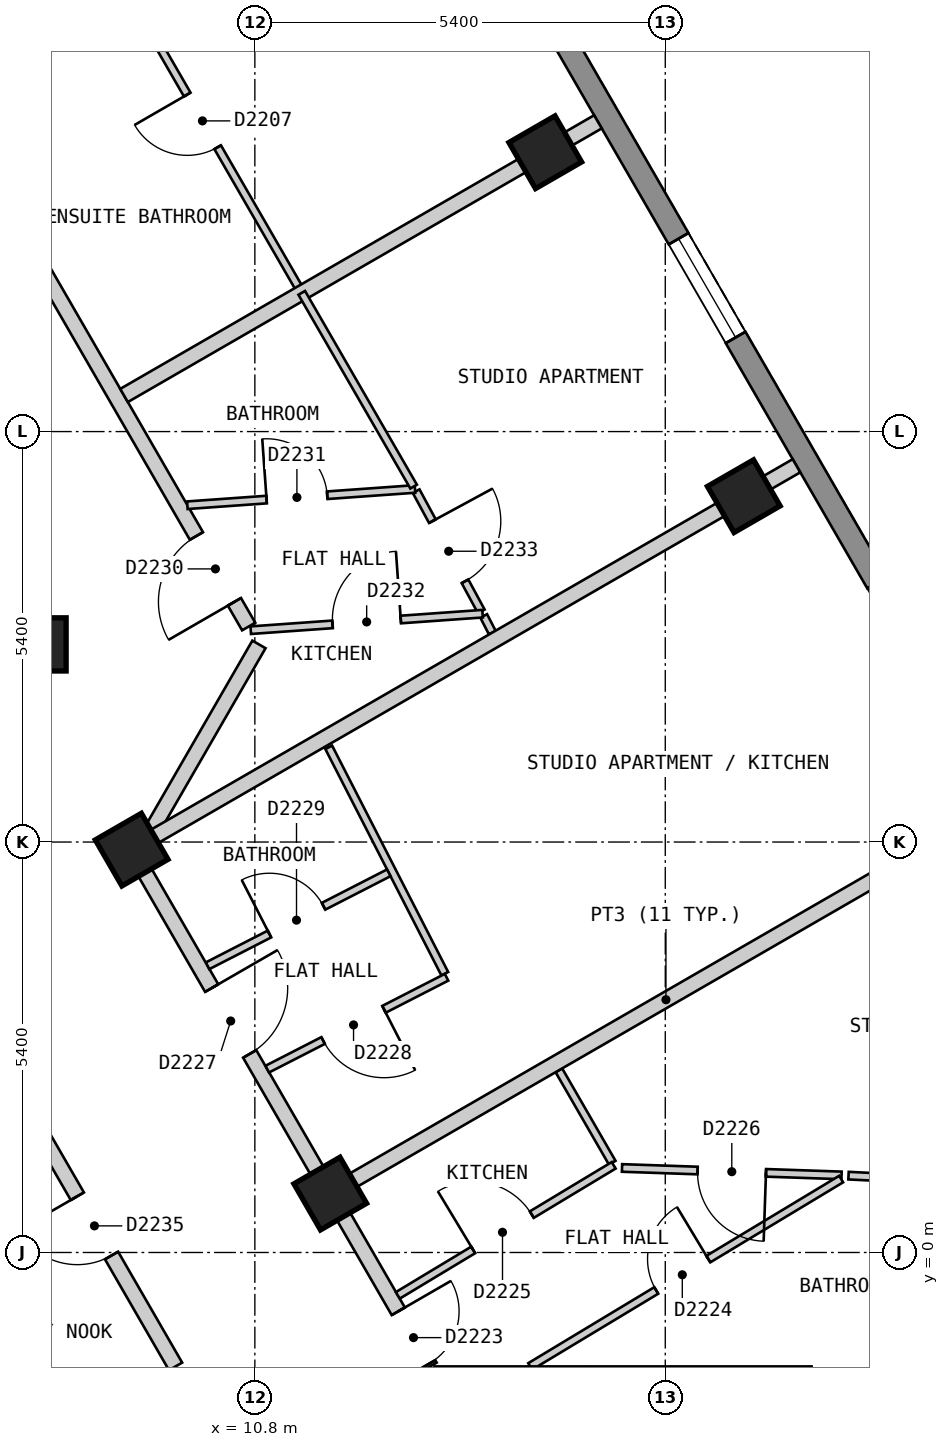
"""IFC4 building model, lengths in metres.
Left out: names, types, materials, properties, quantities, classifications, styles, units other than length and angle.
Written with IfcOpenShell. Run it as: python <this file> out.ifc"""

import sys

from ifc_helpers import new_model, si_unit, direction, frame, frame_2d, origin, origin_2d, place, context, subcontext, project, spatial, polyline, rectangle, outline, extrude, element, fill, save


model = new_model("IFC4")
c1 = context("Model", 3, precision=1e-05, world=origin(), true_north=direction((0.0, 1.0)))
c2 = subcontext(c1, "Body", "Model", "MODEL_VIEW")
j1 = project(units=[si_unit("LENGTHUNIT", "METRE"), si_unit("PLANEANGLEUNIT", "RADIAN")], contexts=[c1])
p1 = place(None, origin())
s1 = spatial("IfcSite", under=j1, at=p1, CompositionType="ELEMENT")
p2 = place(p1, origin())
s2 = spatial("IfcBuilding", under=s1, at=p2, CompositionType="ELEMENT")
p3 = place(p2, frame((0.0, 0.0, 229.8)))
s3 = spatial("IfcBuildingStorey", under=s2, at=p3, CompositionType="ELEMENT", Elevation=229.8)
for number, where, z_axis, x_axis in (
    (1, (17.233, 9.95, 0.0), (0.0, 0.0, 1.0), (-0.5, 0.866, 0.0)),
    (2, (14.621, 14.475, 0.0), (0.0, 0.0, 1.0), (-0.5, 0.866, 0.0)),
    (3, (11.792, 0.775, 0.0), (0.0, 0.0, 1.0), (-0.5, 0.866, 0.0)),
    (4, (9.179, 5.3, 0.0), (0.0, 0.0, 1.0), (-0.5, 0.866, 0.0)),
    (5, (7.967, 8.0, 0.0), (0.0, 0.0, 1.0), (1.0, 0.0, 0.0)),
):
    element("IfcColumn", number, at=place(p3, frame(where, z_axis=z_axis, x_axis=x_axis)), inside=s3, PredefinedType="COLUMN", context=c2, shape_type="SweptSolid", body=[
        extrude(rectangle(XDim=0.7, YDim=0.7, at=origin_2d()), origin(), (0.0, 0.0, 1.0), 3.0),
    ])
p4 = place(p3, frame((23.599, 0.825, 0.0), z_axis=(0.0, 0.0, 1.0), x_axis=(-0.500003656944, 0.866023292436, 0.0)))
e6 = element("IfcWall", 6, at=p4, inside=s3, PredefinedType="SOLIDWALL", context=c2, shape_type="SweptSolid", body=[
    extrude(outline(polyline([(0.0, -0.15), (22.17, -0.15), (22.09, 0.15), (0.08, 0.15), (0.0, -0.15)])), origin(), (0.0, 0.0, 1.0), 2.7),
])
p5 = place(p4, frame((2.497, 0.0, 0.15)))
e7 = element("IfcOpeningElement", 7, at=p5, cuts=e6, PredefinedType="OPENING", context=c2, shape_type="SweptSolid", body=[
    extrude(rectangle(XDim=1.5, YDim=2.1, at=frame_2d((0.75, 1.05))), frame((0.0, 0.16, 0.0), z_axis=(0.0, -1.0, 0.0), x_axis=(1.0, 0.0, 0.0)), (0.0, 0.0, 1.0), 0.32),
])
p6 = place(p4, frame((7.723, 0.0, 0.15)))
e8 = element("IfcOpeningElement", 8, at=p6, cuts=e6, PredefinedType="OPENING", context=c2, shape_type="SweptSolid", body=[
    extrude(rectangle(XDim=1.5, YDim=2.1, at=frame_2d((0.75, 1.05))), frame((0.0, 0.16, 0.0), z_axis=(0.0, -1.0, 0.0), x_axis=(1.0, 0.0, 0.0)), (0.0, 0.0, 1.0), 0.32),
])
p7 = place(p4, frame((12.948, 0.0, 0.15)))
e9 = element("IfcOpeningElement", 9, at=p7, cuts=e6, PredefinedType="OPENING", context=c2, shape_type="SweptSolid", body=[
    extrude(rectangle(XDim=1.5, YDim=2.1, at=frame_2d((0.75, 1.05))), frame((0.0, 0.16, 0.0), z_axis=(0.0, -1.0, 0.0), x_axis=(1.0, 0.0, 0.0)), (0.0, 0.0, 1.0), 0.32),
])
p8 = place(p4, frame((18.173, 0.0, 0.15)))
e10 = element("IfcOpeningElement", 10, at=p8, cuts=e6, PredefinedType="OPENING", context=c2, shape_type="SweptSolid", body=[
    extrude(rectangle(XDim=1.5, YDim=2.1, at=frame_2d((0.75, 1.05))), frame((0.0, 0.16, 0.0), z_axis=(0.0, -1.0, 0.0), x_axis=(1.0, 0.0, 0.0)), (0.0, 0.0, 1.0), 0.32),
])
p9 = place(p3, frame((7.622, 2.199, 0.0), z_axis=(0.0, 0.0, 1.0), x_axis=(0.499994660107, -0.866028486751, 0.0)))
e11 = element("IfcWall", 11, at=p9, inside=s3, PredefinedType="PARTITIONING", context=c2, shape_type="SweptSolid", body=[
    extrude(rectangle(XDim=4.27, YDim=0.2, at=frame_2d((2.135, 0.0))), origin(), (0.0, 0.0, 1.0), 2.7),
])
p10 = place(p9, frame((1.685, 0.0, 0.0)))
e12 = element("IfcOpeningElement", 12, at=p10, cuts=e11, PredefinedType="OPENING", context=c2, shape_type="SweptSolid", body=[
    extrude(rectangle(XDim=0.9, YDim=2.1, at=frame_2d((0.45, 1.05))), frame((0.0, 0.11, 0.0), z_axis=(0.0, -1.0, 0.0), x_axis=(1.0, 0.0, 0.0)), (0.0, 0.0, 1.0), 0.22),
])
p11 = place(p3, frame((9.238, 5.2, 0.0), z_axis=(0.0, 0.0, 1.0), x_axis=(0.500025705601, -0.86601056214, 0.0)))
e13 = element("IfcWall", 13, at=p11, inside=s3, PredefinedType="PARTITIONING", context=c2, shape_type="SweptSolid", body=[
    extrude(rectangle(XDim=7.735, YDim=0.2, at=frame_2d((3.868, 0.0))), origin(), (0.0, 0.0, 1.0), 2.7),
])
p12 = place(p11, frame((6.898, 0.0, 0.0)))
e14 = element("IfcOpeningElement", 14, at=p12, cuts=e13, PredefinedType="OPENING", context=c2, shape_type="SweptSolid", body=[
    extrude(rectangle(XDim=0.8, YDim=2.1, at=frame_2d((0.4, 1.05))), frame((0.0, 0.11, 0.0), z_axis=(0.0, -1.0, 0.0), x_axis=(1.0, 0.0, 0.0)), (0.0, 0.0, 1.0), 0.22),
])
p13 = place(p11, frame((1.988, 0.0, 0.0)))
e15 = element("IfcOpeningElement", 15, at=p13, cuts=e13, PredefinedType="OPENING", context=c2, shape_type="SweptSolid", body=[
    extrude(rectangle(XDim=1.0, YDim=2.1, at=frame_2d((0.5, 1.05))), frame((0.0, 0.11, 0.0), z_axis=(0.0, -1.0, 0.0), x_axis=(1.0, 0.0, 0.0)), (0.0, 0.0, 1.0), 0.22),
])
p14 = place(p3, frame((5.485, 17.3, 0.0), z_axis=(0.0, 0.0, 1.0), x_axis=(0.500017221754, -0.866015460572, 0.0)))
e16 = element("IfcWall", 16, at=p14, inside=s3, PredefinedType="PARTITIONING", context=c2, shape_type="SweptSolid", body=[
    extrude(rectangle(XDim=10.468, YDim=0.2, at=frame_2d((5.234, 0.0))), origin(), (0.0, 0.0, 1.0), 2.7),
])
p15 = place(p14, frame((9.092, 0.0, 0.0)))
e17 = element("IfcOpeningElement", 17, at=p15, cuts=e16, PredefinedType="OPENING", context=c2, shape_type="SweptSolid", body=[
    extrude(rectangle(XDim=1.0, YDim=2.1, at=frame_2d((0.5, 1.05))), frame((0.0, 0.11, 0.0), z_axis=(0.0, -1.0, 0.0), x_axis=(1.0, 0.0, 0.0)), (0.0, 0.0, 1.0), 0.22),
])
p16 = place(p3, frame((9.354, 5.401, 0.0), z_axis=(0.0, 0.0, 1.0), x_axis=(0.499849222119, 0.866112437936, 0.0)))
e18 = element("IfcWall", 18, at=p16, inside=s3, PredefinedType="PARTITIONING", context=c2, shape_type="SweptSolid", body=[
    extrude(rectangle(XDim=3.001, YDim=0.2, at=frame_2d((1.5, 0.0))), origin(), (0.0, 0.0, 1.0), 2.7),
])
p17 = place(p3, frame((14.8, 2.397, 0.0), z_axis=(0.0, 0.0, 1.0), x_axis=(0.49989805765, -0.866084252228, 0.0)))
e19 = element("IfcWall", 19, at=p17, inside=s3, PredefinedType="PARTITIONING", context=c2, shape_type="SweptSolid", body=[
    extrude(rectangle(XDim=1.404, YDim=0.1, at=frame_2d((0.702, 0.0))), origin(), (0.0, 0.0, 1.0), 2.7),
])
p18 = place(p3, frame((8.829, 17.107, 0.0), z_axis=(0.0, 0.0, 1.0), x_axis=(0.500035512416, -0.866004899711, 0.0)))
e20 = element("IfcWall", 20, at=p18, inside=s3, PredefinedType="PARTITIONING", context=c2, shape_type="SweptSolid", body=[
    extrude(rectangle(XDim=5.175, YDim=0.1, at=frame_2d((2.588, 0.0))), origin(), (0.0, 0.0, 1.0), 2.7),
])
p19 = place(p18, frame((2.163, 0.0, 0.0)))
e21 = element("IfcOpeningElement", 21, at=p19, cuts=e20, PredefinedType="OPENING", context=c2, shape_type="SweptSolid", body=[
    extrude(rectangle(XDim=0.8, YDim=2.1, at=frame_2d((0.4, 1.05))), frame((0.0, 0.06, 0.0), z_axis=(0.0, -1.0, 0.0), x_axis=(1.0, 0.0, 0.0)), (0.0, 0.0, 1.0), 0.12),
])
p20 = place(p3, frame((12.922, 10.016, 0.0), z_axis=(0.0, 0.0, 1.0), x_axis=(0.476510550025, -0.879168752695, 0.0)))
e22 = element("IfcWall", 22, at=p20, inside=s3, PredefinedType="PARTITIONING", context=c2, shape_type="SweptSolid", body=[
    extrude(rectangle(XDim=1.798, YDim=0.1, at=frame_2d((0.899, 0.0))), origin(), (0.0, 0.0, 1.0), 2.7),
])
p21 = place(p20, frame((0.449, 0.0, 0.0)))
e23 = element("IfcOpeningElement", 23, at=p21, cuts=e22, PredefinedType="OPENING", context=c2, shape_type="SweptSolid", body=[
    extrude(rectangle(XDim=0.9, YDim=2.1, at=frame_2d((0.45, 1.05))), frame((0.0, 0.06, 0.0), z_axis=(0.0, -1.0, 0.0), x_axis=(1.0, 0.0, 0.0)), (0.0, 0.0, 1.0), 0.12),
])
p22 = place(p3, frame((13.811, 8.375, 0.0), z_axis=(0.0, 0.0, 1.0), x_axis=(0.457058020142, -0.889436881529, 0.0)))
e24 = element("IfcWall", 24, at=p22, inside=s3, PredefinedType="PARTITIONING", context=c2, shape_type="SweptSolid", body=[
    extrude(rectangle(XDim=0.247, YDim=0.1, at=frame_2d((0.124, 0.0))), origin(), (0.0, 0.0, 1.0), 2.7),
])
p23 = place(p3, frame((11.772, 6.646, 0.0), z_axis=(0.0, 0.0, 1.0), x_axis=(0.456175983405, -0.889889584254, 0.0)))
e25 = element("IfcWall", 25, at=p23, inside=s3, PredefinedType="PARTITIONING", context=c2, shape_type="SweptSolid", body=[
    extrude(rectangle(XDim=3.348, YDim=0.1, at=frame_2d((1.674, 0.0))), origin(), (0.0, 0.0, 1.0), 2.7),
])
p24 = place(p3, frame((15.631, 1.112, 0.0), z_axis=(0.0, 0.0, 1.0), x_axis=(0.999423034213, -0.033964668168, 0.0)))
e26 = element("IfcWall", 26, at=p24, inside=s3, PredefinedType="PARTITIONING", context=c2, shape_type="SweptSolid", body=[
    extrude(rectangle(XDim=2.89, YDim=0.1, at=frame_2d((1.445, 0.0))), origin(), (0.0, 0.0, 1.0), 2.7),
])
p25 = place(p24, frame((0.995, 0.0, 0.0)))
e27 = element("IfcOpeningElement", 27, at=p25, cuts=e26, PredefinedType="OPENING", context=c2, shape_type="SweptSolid", body=[
    extrude(rectangle(XDim=0.9, YDim=2.1, at=frame_2d((0.45, 1.05))), frame((0.0, 0.06, 0.0), z_axis=(0.0, -1.0, 0.0), x_axis=(1.0, 0.0, 0.0)), (0.0, 0.0, 1.0), 0.12),
])
p26 = place(p3, frame((10.178, 3.772, 0.0), z_axis=(0.0, 0.0, 1.0), x_axis=(0.889732071959, 0.456483121405, 0.0)))
e28 = element("IfcWall", 28, at=p26, inside=s3, PredefinedType="PARTITIONING", context=c2, shape_type="SweptSolid", body=[
    extrude(rectangle(XDim=2.679, YDim=0.1, at=frame_2d((1.34, 0.0))), origin(), (0.0, 0.0, 1.0), 2.7),
])
p27 = place(p26, frame((0.915, 0.0, 0.0)))
e29 = element("IfcOpeningElement", 29, at=p27, cuts=e28, PredefinedType="OPENING", context=c2, shape_type="SweptSolid", body=[
    extrude(rectangle(XDim=0.8, YDim=2.1, at=frame_2d((0.4, 1.05))), frame((0.0, 0.06, 0.0), z_axis=(0.0, -1.0, 0.0), x_axis=(1.0, 0.0, 0.0)), (0.0, 0.0, 1.0), 0.12),
])
p28 = place(p3, frame((10.963, 2.412, 0.0), z_axis=(0.0, 0.0, 1.0), x_axis=(0.889943997558, 0.456069820543, 0.0)))
e30 = element("IfcWall", 30, at=p28, inside=s3, PredefinedType="PARTITIONING", context=c2, shape_type="SweptSolid", body=[
    extrude(rectangle(XDim=2.651, YDim=0.1, at=frame_2d((1.325, 0.0))), origin(), (0.0, 0.0, 1.0), 2.7),
])
p29 = place(p28, frame((0.826, 0.0, 0.0)))
e31 = element("IfcOpeningElement", 31, at=p29, cuts=e30, PredefinedType="OPENING", context=c2, shape_type="SweptSolid", body=[
    extrude(rectangle(XDim=0.9, YDim=2.1, at=frame_2d((0.45, 1.05))), frame((0.0, 0.06, 0.0), z_axis=(0.0, -1.0, 0.0), x_axis=(1.0, 0.0, 0.0)), (0.0, 0.0, 1.0), 0.12),
])
p30 = place(p3, frame((12.681, -0.564, 0.0), z_axis=(0.0, 0.0, 1.0), x_axis=(0.856575482301, 0.516021746752, 0.0)))
e32 = element("IfcWall", 32, at=p30, inside=s3, PredefinedType="PARTITIONING", context=c2, shape_type="SweptSolid", body=[
    extrude(rectangle(XDim=3.316, YDim=0.1, at=frame_2d((1.658, 0.0))), origin(), (0.0, 0.0, 1.0), 2.7),
])
p31 = place(p30, frame((1.158, 0.0, 0.0)))
e33 = element("IfcOpeningElement", 33, at=p31, cuts=e32, PredefinedType="OPENING", context=c2, shape_type="SweptSolid", body=[
    extrude(rectangle(XDim=0.9, YDim=2.1, at=frame_2d((0.45, 1.05))), frame((0.0, 0.06, 0.0), z_axis=(0.0, -1.0, 0.0), x_axis=(1.0, 0.0, 0.0)), (0.0, 0.0, 1.0), 0.12),
])
p32 = place(p3, frame((14.423, -1.499, 0.0), z_axis=(0.0, 0.0, 1.0), x_axis=(0.856512638305, 0.516126050905, 0.0)))
e34 = element("IfcWall", 34, at=p32, inside=s3, PredefinedType="PARTITIONING", context=c2, shape_type="SweptSolid", body=[
    extrude(rectangle(XDim=4.776, YDim=0.1, at=frame_2d((2.388, 0.0))), origin(), (0.0, 0.0, 1.0), 2.7),
])
p33 = place(p32, frame((1.936, 0.0, 0.0)))
e35 = element("IfcOpeningElement", 35, at=p33, cuts=e34, PredefinedType="OPENING", context=c2, shape_type="SweptSolid", body=[
    extrude(rectangle(XDim=0.8, YDim=2.1, at=frame_2d((0.4, 1.05))), frame((0.0, 0.06, 0.0), z_axis=(0.0, -1.0, 0.0), x_axis=(1.0, 0.0, 0.0)), (0.0, 0.0, 1.0), 0.12),
])
p34 = place(p3, frame((10.746, 8.187, 0.0), z_axis=(0.0, 0.0, 1.0), x_axis=(0.997477310687, 0.070986017387, 0.0)))
e36 = element("IfcWall", 36, at=p34, inside=s3, PredefinedType="PARTITIONING", context=c2, shape_type="SweptSolid", body=[
    extrude(rectangle(XDim=3.058, YDim=0.1, at=frame_2d((1.529, 0.0))), origin(), (0.0, 0.0, 1.0), 2.7),
])
p35 = place(p34, frame((1.079, 0.0, 0.0)))
e37 = element("IfcOpeningElement", 37, at=p35, cuts=e36, PredefinedType="OPENING", context=c2, shape_type="SweptSolid", body=[
    extrude(rectangle(XDim=0.9, YDim=2.1, at=frame_2d((0.45, 1.05))), frame((0.0, 0.06, 0.0), z_axis=(0.0, -1.0, 0.0), x_axis=(1.0, 0.0, 0.0)), (0.0, 0.0, 1.0), 0.12),
])
p36 = place(p3, frame((9.912, 9.831, 0.0), z_axis=(0.0, 0.0, 1.0), x_axis=(0.997459937941, 0.071229714326, 0.0)))
e38 = element("IfcWall", 38, at=p36, inside=s3, PredefinedType="PARTITIONING", context=c2, shape_type="SweptSolid", body=[
    extrude(rectangle(XDim=3.002, YDim=0.1, at=frame_2d((1.501, 0.0))), origin(), (0.0, 0.0, 1.0), 2.7),
])
p37 = place(p36, frame((1.045, 0.0, 0.0)))
e39 = element("IfcOpeningElement", 39, at=p37, cuts=e38, PredefinedType="OPENING", context=c2, shape_type="SweptSolid", body=[
    extrude(rectangle(XDim=0.8, YDim=2.1, at=frame_2d((0.4, 1.05))), frame((0.0, 0.06, 0.0), z_axis=(0.0, -1.0, 0.0), x_axis=(1.0, 0.0, 0.0)), (0.0, 0.0, 1.0), 0.12),
])
p38 = place(p3, frame((13.163, -1.599, 0.0), z_axis=(0.0, 0.0, 1.0), x_axis=(1.0, 0.0, 0.0)))
e40 = element("IfcWall", 40, at=p38, inside=s3, PredefinedType="PARTITIONING", context=c2, shape_type="SweptSolid", body=[
    extrude(rectangle(XDim=4.962, YDim=0.2, at=frame_2d((2.481, 0.0))), origin(), (0.0, 0.0, 1.0), 2.7),
])
p39 = place(p3, frame((11.879, 0.826, 0.0), z_axis=(0.0, 0.0, 1.0), x_axis=(0.866065245018, 0.499930986609, 0.0)))
e41 = element("IfcWall", 41, at=p39, inside=s3, PredefinedType="PARTITIONING", context=c2, shape_type="SweptSolid", body=[
    extrude(rectangle(XDim=10.0, YDim=0.2, at=frame_2d((5.0, 0.0))), origin(), (0.0, 0.0, 1.0), 2.7),
])
p40 = place(p3, frame((9.457, 5.461, 0.0), z_axis=(0.0, 0.0, 1.0), x_axis=(0.866043818878, 0.499968102766, 0.0)))
e42 = element("IfcWall", 42, at=p40, inside=s3, PredefinedType="PARTITIONING", context=c2, shape_type="SweptSolid", body=[
    extrude(rectangle(XDim=9.779, YDim=0.2, at=frame_2d((4.89, 0.0))), origin(), (0.0, 0.0, 1.0), 2.7),
])
p41 = place(p3, frame((9.079, 11.275, 0.0), z_axis=(0.0, 0.0, 1.0), x_axis=(0.866001485781, 0.500041424909, 0.0)))
e43 = element("IfcWall", 43, at=p41, inside=s3, PredefinedType="PARTITIONING", context=c2, shape_type="SweptSolid", body=[
    extrude(rectangle(XDim=7.2, YDim=0.2, at=frame_2d((3.6, 0.0))), origin(), (0.0, 0.0, 1.0), 2.7),
])
p42 = place(p3, frame((18.611, 1.011, 0.0), z_axis=(0.0, 0.0, 1.0), x_axis=(0.998789491469, -0.049188939117, 0.0)))
e44 = element("IfcWall", 44, at=p42, inside=s3, PredefinedType="PARTITIONING", context=c2, shape_type="SweptSolid", body=[
    extrude(rectangle(XDim=1.057, YDim=0.1, at=frame_2d((0.529, 0.0))), origin(), (0.0, 0.0, 1.0), 2.7),
])
p43 = place(p3, frame((11.417, 12.625, 0.0), z_axis=(0.0, 0.0, 1.0), x_axis=(0.500055103712, -0.865993587304, 0.0)))
e45 = element("IfcWall", 45, at=p43, inside=s3, PredefinedType="PARTITIONING", context=c2, shape_type="SweptSolid", body=[
    extrude(rectangle(XDim=2.944, YDim=0.1, at=frame_2d((1.472, 0.0))), origin(), (0.0, 0.0, 1.0), 2.7),
])
p44 = place(p7, origin())
e46 = element("IfcWindow", 46, at=p44, inside=s3, PartitioningType="SINGLE_PANEL", PredefinedType="WINDOW", context=c2, shape_type="SweptSolid", body=[
    extrude(rectangle(XDim=1.5, YDim=2.1, at=frame_2d((0.75, 1.05))), frame((0.0, 0.03, 0.0), z_axis=(0.0, -1.0, 0.0), x_axis=(1.0, 0.0, 0.0)), (0.0, 0.0, 1.0), 0.06),
])
fill(e9, e46)
p45 = place(p19, origin())
e47 = element("IfcDoor", 47, at=p45, inside=s3, OperationType="SINGLE_SWING_LEFT", PredefinedType="DOOR", context=c2, shape_type="SweptSolid", body=[
    extrude(rectangle(XDim=0.8, YDim=2.1, at=frame_2d((0.4, 1.05))), frame((0.0, 0.025, 0.0), z_axis=(0.0, -1.0, 0.0), x_axis=(1.0, 0.0, 0.0)), (0.0, 0.0, 1.0), 0.05),
])
fill(e21, e47)
p46 = place(p12, origin())
e48 = element("IfcDoor", 48, at=p46, inside=s3, OperationType="SINGLE_SWING_LEFT", PredefinedType="DOOR", context=c2, shape_type="SweptSolid", body=[
    extrude(rectangle(XDim=0.8, YDim=2.1, at=frame_2d((0.4, 1.05))), frame((0.0, 0.025, 0.0), z_axis=(0.0, -1.0, 0.0), x_axis=(1.0, 0.0, 0.0)), (0.0, 0.0, 1.0), 0.05),
])
fill(e14, e48)
p47 = place(p33, origin())
e49 = element("IfcDoor", 49, at=p47, inside=s3, OperationType="SINGLE_SWING_RIGHT", PredefinedType="DOOR", context=c2, shape_type="SweptSolid", body=[
    extrude(rectangle(XDim=0.8, YDim=2.1, at=frame_2d((0.4, 1.05))), frame((0.0, 0.025, 0.0), z_axis=(0.0, -1.0, 0.0), x_axis=(1.0, 0.0, 0.0)), (0.0, 0.0, 1.0), 0.05),
])
fill(e35, e49)
p48 = place(p31, origin())
e50 = element("IfcDoor", 50, at=p48, inside=s3, OperationType="SINGLE_SWING_LEFT", PredefinedType="DOOR", context=c2, shape_type="SweptSolid", body=[
    extrude(rectangle(XDim=0.9, YDim=2.1, at=frame_2d((0.45, 1.05))), frame((0.0, 0.025, 0.0), z_axis=(0.0, -1.0, 0.0), x_axis=(1.0, 0.0, 0.0)), (0.0, 0.0, 1.0), 0.05),
])
fill(e33, e50)
p49 = place(p25, origin())
e51 = element("IfcDoor", 51, at=p49, inside=s3, OperationType="SINGLE_SWING_RIGHT", PredefinedType="DOOR", context=c2, shape_type="SweptSolid", body=[
    extrude(rectangle(XDim=0.9, YDim=2.1, at=frame_2d((0.45, 1.05))), frame((0.0, 0.025, 0.0), z_axis=(0.0, -1.0, 0.0), x_axis=(1.0, 0.0, 0.0)), (0.0, 0.0, 1.0), 0.05),
])
fill(e27, e51)
p50 = place(p13, origin())
e52 = element("IfcDoor", 52, at=p50, inside=s3, OperationType="SINGLE_SWING_LEFT", PredefinedType="DOOR", context=c2, shape_type="SweptSolid", body=[
    extrude(rectangle(XDim=1.0, YDim=2.1, at=frame_2d((0.5, 1.05))), frame((0.0, 0.025, 0.0), z_axis=(0.0, -1.0, 0.0), x_axis=(1.0, 0.0, 0.0)), (0.0, 0.0, 1.0), 0.05),
])
fill(e15, e52)
p51 = place(p29, origin())
e53 = element("IfcDoor", 53, at=p51, inside=s3, OperationType="SINGLE_SWING_RIGHT", PredefinedType="DOOR", context=c2, shape_type="SweptSolid", body=[
    extrude(rectangle(XDim=0.9, YDim=2.1, at=frame_2d((0.45, 1.05))), frame((0.0, 0.025, 0.0), z_axis=(0.0, -1.0, 0.0), x_axis=(1.0, 0.0, 0.0)), (0.0, 0.0, 1.0), 0.05),
])
fill(e31, e53)
p52 = place(p27, origin())
e54 = element("IfcDoor", 54, at=p52, inside=s3, OperationType="SINGLE_SWING_LEFT", PredefinedType="DOOR", context=c2, shape_type="SweptSolid", body=[
    extrude(rectangle(XDim=0.8, YDim=2.1, at=frame_2d((0.4, 1.05))), frame((0.0, 0.025, 0.0), z_axis=(0.0, -1.0, 0.0), x_axis=(1.0, 0.0, 0.0)), (0.0, 0.0, 1.0), 0.05),
])
fill(e29, e54)
p53 = place(p15, origin())
e55 = element("IfcDoor", 55, at=p53, inside=s3, OperationType="SINGLE_SWING_RIGHT", PredefinedType="DOOR", context=c2, shape_type="SweptSolid", body=[
    extrude(rectangle(XDim=1.0, YDim=2.1, at=frame_2d((0.5, 1.05))), frame((0.0, 0.025, 0.0), z_axis=(0.0, -1.0, 0.0), x_axis=(1.0, 0.0, 0.0)), (0.0, 0.0, 1.0), 0.05),
])
fill(e17, e55)
p54 = place(p37, origin())
e56 = element("IfcDoor", 56, at=p54, inside=s3, OperationType="SINGLE_SWING_LEFT", PredefinedType="DOOR", context=c2, shape_type="SweptSolid", body=[
    extrude(rectangle(XDim=0.8, YDim=2.1, at=frame_2d((0.4, 1.05))), frame((0.0, 0.025, 0.0), z_axis=(0.0, -1.0, 0.0), x_axis=(1.0, 0.0, 0.0)), (0.0, 0.0, 1.0), 0.05),
])
fill(e39, e56)
p55 = place(p35, origin())
e57 = element("IfcDoor", 57, at=p55, inside=s3, OperationType="SINGLE_SWING_RIGHT", PredefinedType="DOOR", context=c2, shape_type="SweptSolid", body=[
    extrude(rectangle(XDim=0.9, YDim=2.1, at=frame_2d((0.45, 1.05))), frame((0.0, 0.025, 0.0), z_axis=(0.0, -1.0, 0.0), x_axis=(1.0, 0.0, 0.0)), (0.0, 0.0, 1.0), 0.05),
])
fill(e37, e57)
p56 = place(p21, origin())
e58 = element("IfcDoor", 58, at=p56, inside=s3, OperationType="SINGLE_SWING_LEFT", PredefinedType="DOOR", context=c2, shape_type="SweptSolid", body=[
    extrude(rectangle(XDim=0.9, YDim=2.1, at=frame_2d((0.45, 1.05))), frame((0.0, 0.025, 0.0), z_axis=(0.0, -1.0, 0.0), x_axis=(1.0, 0.0, 0.0)), (0.0, 0.0, 1.0), 0.05),
])
fill(e23, e58)
p57 = place(p10, origin())
e59 = element("IfcDoor", 59, at=p57, inside=s3, OperationType="SINGLE_SWING_LEFT", PredefinedType="DOOR", context=c2, shape_type="SweptSolid", body=[
    extrude(rectangle(XDim=0.9, YDim=2.1, at=frame_2d((0.45, 1.05))), frame((0.0, 0.025, 0.0), z_axis=(0.0, -1.0, 0.0), x_axis=(1.0, 0.0, 0.0)), (0.0, 0.0, 1.0), 0.05),
])
fill(e12, e59)
save(model, sys.argv[1])
